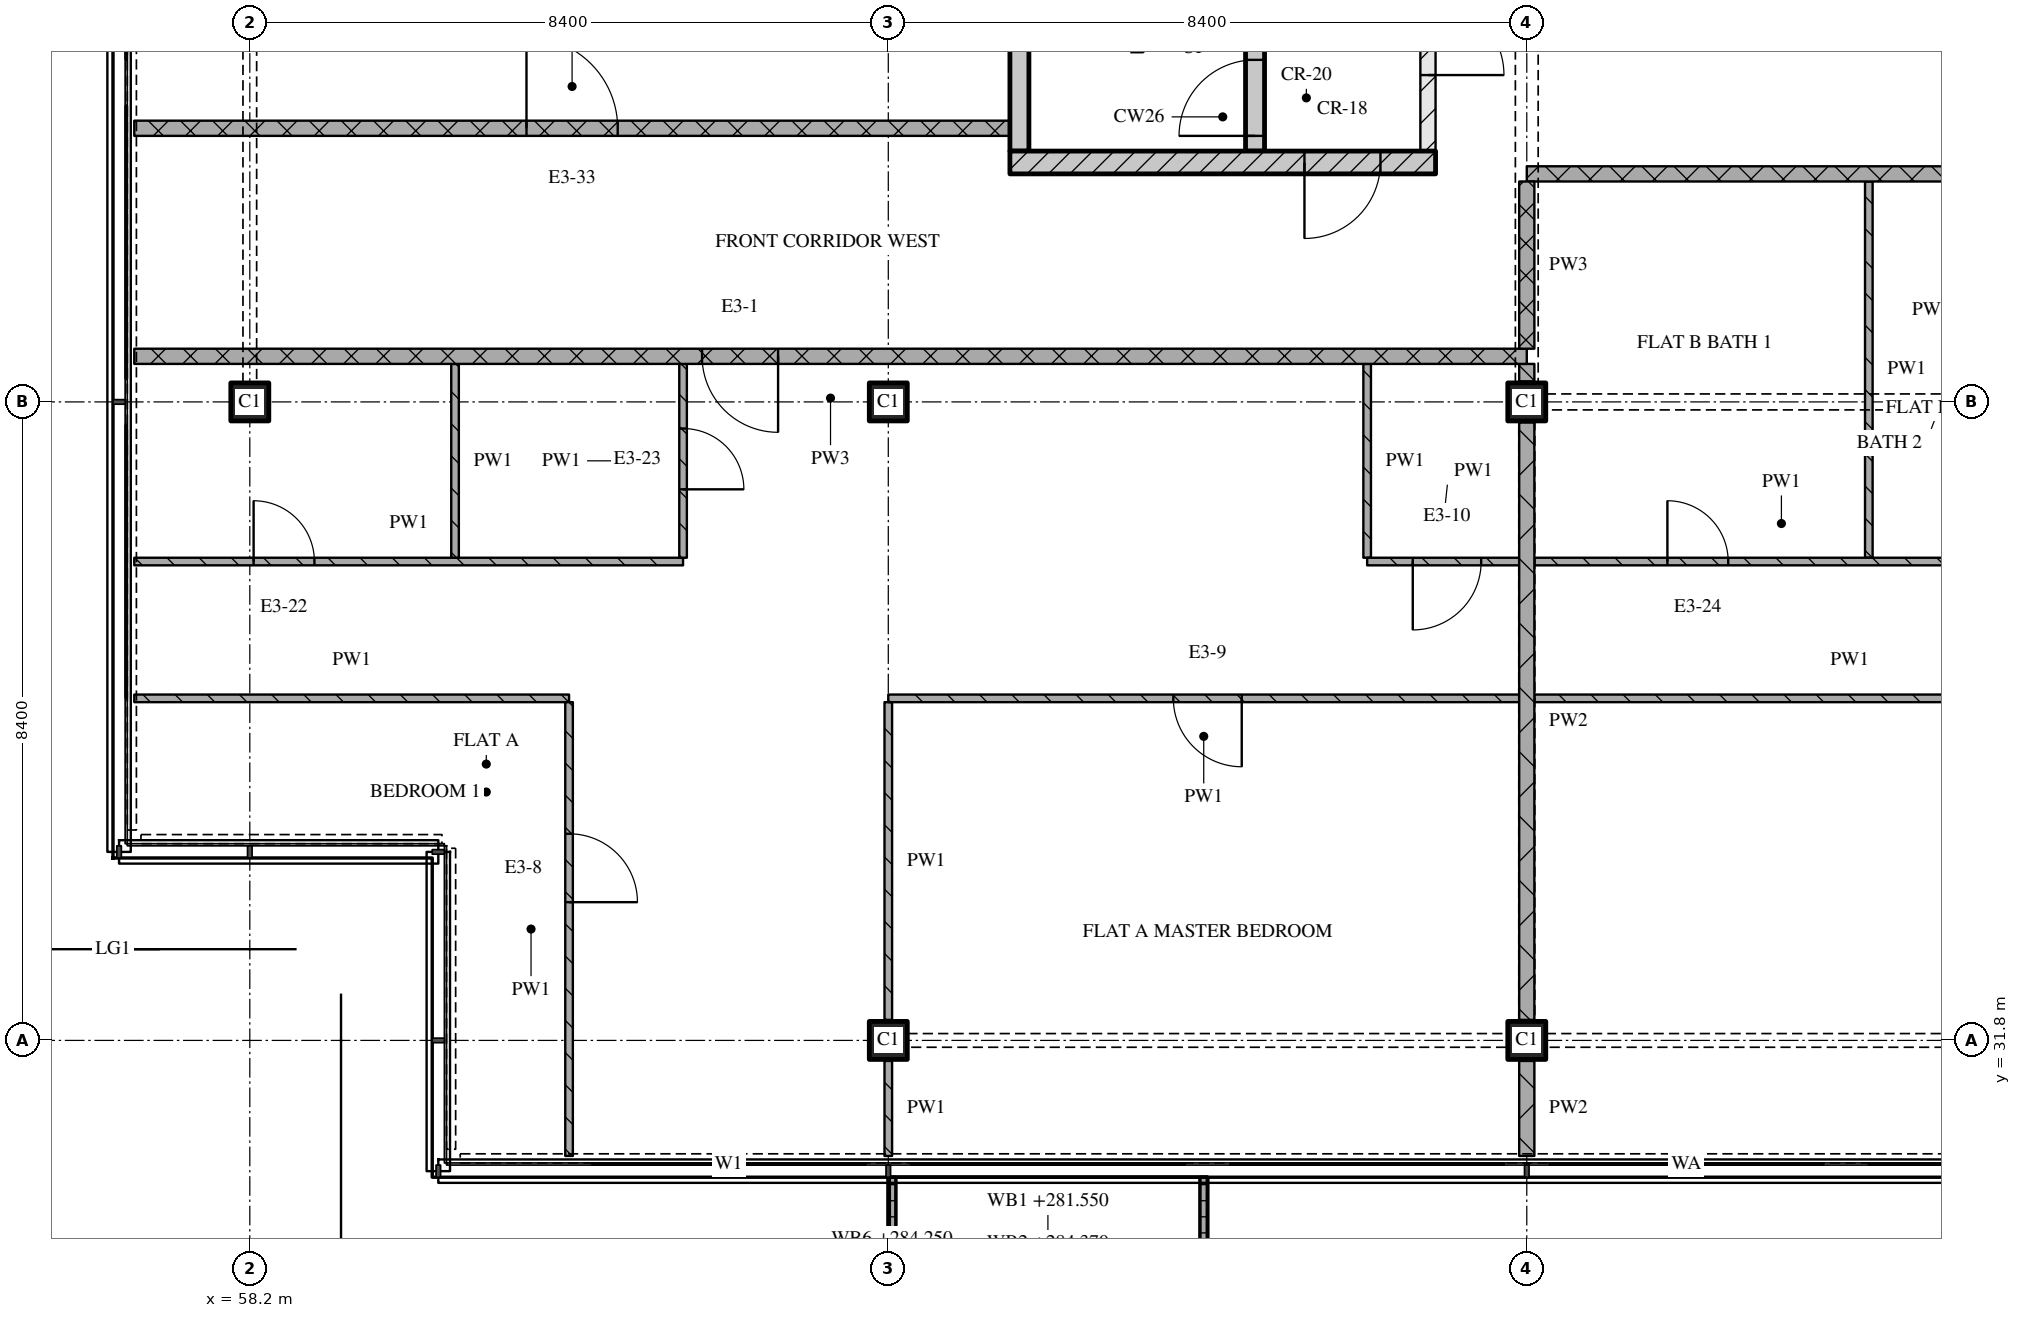
"""IFC4 building model, lengths in metres.
Left out: names, types, materials, properties, quantities, classifications, styles, units other than length and angle.
Written with IfcOpenShell. Run it as: python <this file> out.ifc"""

import sys

from ifc_helpers import new_model, si_unit, direction, frame, frame_2d, origin, origin_2d, place, context, subcontext, project, spatial, polyline, rectangle, outline, extrude, element, fill, save


model = new_model("IFC4")
c1 = context("Model", 3, precision=1e-05, world=origin(), true_north=direction((0.0, 1.0)))
c2 = subcontext(c1, "Body", "Model", "MODEL_VIEW")
j1 = project(units=[si_unit("LENGTHUNIT", "METRE"), si_unit("PLANEANGLEUNIT", "RADIAN")], contexts=[c1])
p1 = place(None, origin())
s1 = spatial("IfcSite", under=j1, at=p1, CompositionType="ELEMENT")
p2 = place(p1, origin())
s2 = spatial("IfcBuilding", under=s1, at=p2, CompositionType="ELEMENT")
p3 = place(p2, frame((0.0, 0.0, 281.55)))
s3 = spatial("IfcBuildingStorey", under=s2, at=p3, CompositionType="ELEMENT", Elevation=281.55)
for number, where, z_axis, x_axis in (
    (1, (58.2, 40.2, 0.0), (0.0, 0.0, 1.0), (1.0, 0.0, 0.0)),
    (2, (66.6, 31.8, 0.0), (0.0, 0.0, 1.0), (1.0, 0.0, 0.0)),
    (3, (66.6, 40.2, 0.0), (0.0, 0.0, 1.0), (1.0, 0.0, 0.0)),
    (4, (75.0, 31.8, 0.0), (0.0, 0.0, 1.0), (1.0, 0.0, 0.0)),
    (5, (75.0, 40.2, 0.0), (0.0, 0.0, 1.0), (1.0, 0.0, 0.0)),
):
    element("IfcColumn", number, at=place(p3, frame(where, z_axis=z_axis, x_axis=x_axis)), inside=s3, PredefinedType="COLUMN", context=c2, shape_type="SweptSolid", body=[
        extrude(rectangle(XDim=0.5, YDim=0.5, at=origin_2d()), origin(), (0.0, 0.0, 1.0), 3.6),
    ])
p4 = place(p3, origin())
e6 = element("IfcWall", 6, at=p4, inside=s3, PredefinedType="SOLIDWALL", context=c2, shape_type="SweptSolid", body=[
    extrude(outline(polyline([(66.6, 30.0), (66.7, 30.0), (66.7, 28.367), (70.7, 28.367), (70.7, 30.0), (70.8, 30.0), (70.8, 28.267), (66.6, 28.267), (66.6, 30.0)])), origin(), (0.0, 0.0, 1.0), 1.0),
])
p5 = place(p3, frame((68.2, 43.35, 0.0), z_axis=(0.0, 0.0, 1.0), x_axis=(1.0, 0.0, 0.0)))
e7 = element("IfcWall", 7, at=p5, inside=s3, PredefinedType="SOLIDWALL", context=c2, shape_type="SweptSolid", body=[
    extrude(rectangle(XDim=5.6, YDim=0.3, at=frame_2d((2.8, 0.0))), origin(), (0.0, 0.0, 1.0), 3.32),
])
p6 = place(p5, frame((3.875, 0.0, 0.0)))
e8 = element("IfcOpeningElement", 8, at=p6, cuts=e7, PredefinedType="OPENING", context=c2, shape_type="SweptSolid", body=[
    extrude(rectangle(XDim=1.0, YDim=2.1, at=frame_2d((0.5, 1.05))), frame((0.0, 0.16, 0.0), z_axis=(0.0, -1.0, 0.0), x_axis=(1.0, 0.0, 0.0)), (0.0, 0.0, 1.0), 0.32),
])
p7 = place(p3, frame((68.325, 43.5, 0.0), z_axis=(0.0, 0.0, 1.0), x_axis=(0.0, 1.0, 0.0)))
e9 = element("IfcWall", 9, at=p7, inside=s3, PredefinedType="SOLIDWALL", context=c2, shape_type="SweptSolid", body=[
    extrude(rectangle(XDim=6.9, YDim=0.25, at=frame_2d((3.45, 0.0))), origin(), (0.0, 0.0, 1.0), 3.32),
])
p8 = place(p3, frame((71.425, 43.5, 0.0), z_axis=(0.0, 0.0, 1.0), x_axis=(0.0, 1.0, 0.0)))
e10 = element("IfcWall", 10, at=p8, inside=s3, PredefinedType="SOLIDWALL", context=c2, shape_type="SweptSolid", body=[
    extrude(rectangle(XDim=6.9, YDim=0.25, at=frame_2d((3.45, 0.0))), origin(), (0.0, 0.0, 1.0), 3.32),
])
p9 = place(p8, frame((0.2, 0.0, 0.0)))
e11 = element("IfcOpeningElement", 11, at=p9, cuts=e10, PredefinedType="OPENING", context=c2, shape_type="SweptSolid", body=[
    extrude(rectangle(XDim=1.0, YDim=2.1, at=frame_2d((0.5, 1.05))), frame((0.0, 0.135, 0.0), z_axis=(0.0, -1.0, 0.0), x_axis=(1.0, 0.0, 0.0)), (0.0, 0.0, 1.0), 0.27),
])
p10 = place(p3, frame((73.7, 43.5, 0.0), z_axis=(0.0, 0.0, 1.0), x_axis=(0.0, 1.0, 0.0)))
e12 = element("IfcWall", 12, at=p10, inside=s3, PredefinedType="PARTITIONING", context=c2, shape_type="SweptSolid", body=[
    extrude(rectangle(XDim=6.9, YDim=0.2, at=frame_2d((3.45, 0.0))), origin(), (0.0, 0.0, 1.0), 3.32),
])
p11 = place(p10, frame((1.0, 0.0, 0.0)))
e13 = element("IfcOpeningElement", 13, at=p11, cuts=e12, PredefinedType="OPENING", context=c2, shape_type="SweptSolid", body=[
    extrude(rectangle(XDim=1.0, YDim=2.1, at=frame_2d((0.5, 1.05))), frame((0.0, 0.11, 0.0), z_axis=(0.0, -1.0, 0.0), x_axis=(1.0, 0.0, 0.0)), (0.0, 0.0, 1.0), 0.22),
])
p12 = place(p3, frame((56.68, 36.3, 0.0), z_axis=(0.0, 0.0, 1.0), x_axis=(1.0, 0.0, 0.0)))
e14 = element("IfcWall", 14, at=p12, inside=s3, PredefinedType="PARTITIONING", context=c2, shape_type="SweptSolid", body=[
    extrude(rectangle(XDim=5.72, YDim=0.1, at=frame_2d((2.86, 0.0))), origin(), (0.0, 0.0, 1.0), 3.32),
])
p13 = place(p3, frame((56.68, 38.1, 0.0), z_axis=(0.0, 0.0, 1.0), x_axis=(1.0, 0.0, 0.0)))
e15 = element("IfcWall", 15, at=p13, inside=s3, PredefinedType="PARTITIONING", context=c2, shape_type="SweptSolid", body=[
    extrude(rectangle(XDim=7.22, YDim=0.1, at=frame_2d((3.61, 0.0))), origin(), (0.0, 0.0, 1.0), 3.32),
])
p14 = place(p13, frame((1.57, 0.0, 0.0)))
e16 = element("IfcOpeningElement", 16, at=p14, cuts=e15, PredefinedType="OPENING", context=c2, shape_type="SweptSolid", body=[
    extrude(rectangle(XDim=0.8, YDim=2.1, at=frame_2d((0.4, 1.05))), frame((0.0, 0.06, 0.0), z_axis=(0.0, -1.0, 0.0), x_axis=(1.0, 0.0, 0.0)), (0.0, 0.0, 1.0), 0.12),
])
p15 = place(p3, frame((75.0, 40.8, 0.0), z_axis=(0.0, 0.0, 1.0), x_axis=(-1.0, 0.0, 0.0)))
e17 = element("IfcWall", 17, at=p15, inside=s3, PredefinedType="PARTITIONING", context=c2, shape_type="SweptSolid", body=[
    extrude(rectangle(XDim=18.32, YDim=0.2, at=frame_2d((9.16, 0.0))), origin(), (0.0, 0.0, 1.0), 3.32),
])
p16 = place(p15, frame((9.85, 0.0, 0.0)))
e18 = element("IfcOpeningElement", 18, at=p16, cuts=e17, PredefinedType="OPENING", context=c2, shape_type="SweptSolid", body=[
    extrude(rectangle(XDim=1.0, YDim=2.1, at=frame_2d((0.5, 1.05))), frame((0.0, 0.11, 0.0), z_axis=(0.0, -1.0, 0.0), x_axis=(1.0, 0.0, 0.0)), (0.0, 0.0, 1.0), 0.22),
])
p17 = place(p3, frame((100.2, 43.2, 0.0), z_axis=(0.0, 0.0, 1.0), x_axis=(-1.0, 0.0, 0.0)))
e19 = element("IfcWall", 19, at=p17, inside=s3, PredefinedType="PARTITIONING", context=c2, shape_type="SweptSolid", body=[
    extrude(rectangle(XDim=25.2, YDim=0.2, at=frame_2d((12.6, 0.0))), origin(), (0.0, 0.0, 1.0), 3.32),
])
p18 = place(p17, frame((17.35, 0.0, 0.0)))
e20 = element("IfcOpeningElement", 20, at=p18, cuts=e19, PredefinedType="OPENING", context=c2, shape_type="SweptSolid", body=[
    extrude(rectangle(XDim=1.0, YDim=2.1, at=frame_2d((0.5, 1.05))), frame((0.0, 0.11, 0.0), z_axis=(0.0, -1.0, 0.0), x_axis=(1.0, 0.0, 0.0)), (0.0, 0.0, 1.0), 0.22),
])
p19 = place(p3, frame((56.68, 43.8, 0.0), z_axis=(0.0, 0.0, 1.0), x_axis=(1.0, 0.0, 0.0)))
e21 = element("IfcWall", 21, at=p19, inside=s3, PredefinedType="PARTITIONING", context=c2, shape_type="SweptSolid", body=[
    extrude(rectangle(XDim=11.52, YDim=0.2, at=frame_2d((5.76, 0.0))), origin(), (0.0, 0.0, 1.0), 3.32),
])
p20 = place(p19, frame((5.16, 0.0, 0.0)))
e22 = element("IfcOpeningElement", 22, at=p20, cuts=e21, PredefinedType="OPENING", context=c2, shape_type="SweptSolid", body=[
    extrude(rectangle(XDim=1.2, YDim=2.1, at=frame_2d((0.6, 1.05))), frame((0.0, 0.11, 0.0), z_axis=(0.0, -1.0, 0.0), x_axis=(1.0, 0.0, 0.0)), (0.0, 0.0, 1.0), 0.22),
])
p21 = place(p3, frame((60.9, 40.7, 0.0), z_axis=(0.0, 0.0, 1.0), x_axis=(0.0, -1.0, 0.0)))
e23 = element("IfcWall", 23, at=p21, inside=s3, PredefinedType="PARTITIONING", context=c2, shape_type="SweptSolid", body=[
    extrude(rectangle(XDim=2.55, YDim=0.1, at=frame_2d((1.275, 0.0))), origin(), (0.0, 0.0, 1.0), 3.32),
])
p22 = place(p3, frame((62.4, 30.28, 0.0), z_axis=(0.0, 0.0, 1.0), x_axis=(0.0, 1.0, 0.0)))
e24 = element("IfcWall", 24, at=p22, inside=s3, PredefinedType="PARTITIONING", context=c2, shape_type="SweptSolid", body=[
    extrude(rectangle(XDim=5.97, YDim=0.1, at=frame_2d((2.985, 0.0))), origin(), (0.0, 0.0, 1.0), 3.32),
])
p23 = place(p22, frame((3.339, 0.0, 0.0)))
e25 = element("IfcOpeningElement", 25, at=p23, cuts=e24, PredefinedType="OPENING", context=c2, shape_type="SweptSolid", body=[
    extrude(rectangle(XDim=0.9, YDim=2.1, at=frame_2d((0.45, 1.05))), frame((0.0, 0.06, 0.0), z_axis=(0.0, -1.0, 0.0), x_axis=(1.0, 0.0, 0.0)), (0.0, 0.0, 1.0), 0.12),
])
p24 = place(p3, frame((63.9, 38.15, 0.0), z_axis=(0.0, 0.0, 1.0), x_axis=(0.0, 1.0, 0.0)))
e26 = element("IfcWall", 26, at=p24, inside=s3, PredefinedType="PARTITIONING", context=c2, shape_type="SweptSolid", body=[
    extrude(rectangle(XDim=2.55, YDim=0.1, at=frame_2d((1.275, 0.0))), origin(), (0.0, 0.0, 1.0), 3.32),
])
p25 = place(p24, frame((0.9, 0.0, 0.0)))
e27 = element("IfcOpeningElement", 27, at=p25, cuts=e26, PredefinedType="OPENING", context=c2, shape_type="SweptSolid", body=[
    extrude(rectangle(XDim=0.8, YDim=2.1, at=frame_2d((0.4, 1.05))), frame((0.0, 0.06, 0.0), z_axis=(0.0, -1.0, 0.0), x_axis=(1.0, 0.0, 0.0)), (0.0, 0.0, 1.0), 0.12),
])
p26 = place(p3, frame((66.6, 31.53, 0.0), z_axis=(0.0, 0.0, 1.0), x_axis=(0.0, -1.0, 0.0)))
e28 = element("IfcWall", 28, at=p26, inside=s3, PredefinedType="PARTITIONING", context=c2, shape_type="SweptSolid", body=[
    extrude(rectangle(XDim=1.25, YDim=0.1, at=frame_2d((0.625, 0.0))), origin(), (0.0, 0.0, 1.0), 3.32),
])
p27 = place(p3, frame((66.6, 36.25, 0.0), z_axis=(0.0, 0.0, 1.0), x_axis=(0.0, -1.0, 0.0)))
e29 = element("IfcWall", 29, at=p27, inside=s3, PredefinedType="PARTITIONING", context=c2, shape_type="SweptSolid", body=[
    extrude(rectangle(XDim=4.18, YDim=0.1, at=frame_2d((2.09, 0.0))), origin(), (0.0, 0.0, 1.0), 2.83),
])
p28 = place(p3, frame((72.9, 40.7, 0.0), z_axis=(0.0, 0.0, 1.0), x_axis=(0.0, -1.0, 0.0)))
e30 = element("IfcWall", 30, at=p28, inside=s3, PredefinedType="PARTITIONING", context=c2, shape_type="SweptSolid", body=[
    extrude(rectangle(XDim=2.55, YDim=0.1, at=frame_2d((1.275, 0.0))), origin(), (0.0, 0.0, 1.0), 3.32),
])
p29 = place(p3, frame((75.0, 43.1, 0.0), z_axis=(0.0, 0.0, 1.0), x_axis=(0.0, -1.0, 0.0)))
e31 = element("IfcWall", 31, at=p29, inside=s3, PredefinedType="PARTITIONING", context=c2, shape_type="SweptSolid", body=[
    extrude(rectangle(XDim=2.2, YDim=0.2, at=frame_2d((1.1, 0.0))), origin(), (0.0, 0.0, 1.0), 2.53),
])
p30 = place(p3, frame((75.0, 31.53, 0.0), z_axis=(0.0, 0.0, 1.0), x_axis=(0.0, -1.0, 0.0)))
e32 = element("IfcWall", 32, at=p30, inside=s3, PredefinedType="PARTITIONING", context=c2, shape_type="SweptSolid", body=[
    extrude(rectangle(XDim=1.25, YDim=0.2, at=frame_2d((0.625, 0.0))), origin(), (0.0, 0.0, 1.0), 3.32),
])
p31 = place(p3, frame((75.0, 39.93, 0.0), z_axis=(0.0, 0.0, 1.0), x_axis=(0.0, -1.0, 0.0)))
e33 = element("IfcWall", 33, at=p31, inside=s3, PredefinedType="PARTITIONING", context=c2, shape_type="SweptSolid", body=[
    extrude(rectangle(XDim=7.86, YDim=0.2, at=frame_2d((3.93, 0.0))), origin(), (0.0, 0.0, 1.0), 2.83),
])
p32 = place(p3, frame((75.0, 40.7, 0.0), z_axis=(0.0, 0.0, 1.0), x_axis=(0.0, -1.0, 0.0)))
e34 = element("IfcWall", 34, at=p32, inside=s3, PredefinedType="PARTITIONING", context=c2, shape_type="SweptSolid", body=[
    extrude(rectangle(XDim=0.23, YDim=0.2, at=frame_2d((0.115, 0.0))), origin(), (0.0, 0.0, 1.0), 3.32),
])
p33 = place(p3, frame((79.5, 43.1, 0.0), z_axis=(0.0, 0.0, 1.0), x_axis=(0.0, -1.0, 0.0)))
e35 = element("IfcWall", 35, at=p33, inside=s3, PredefinedType="PARTITIONING", context=c2, shape_type="SweptSolid", body=[
    extrude(rectangle(XDim=4.95, YDim=0.1, at=frame_2d((2.475, 0.0))), origin(), (0.0, 0.0, 1.0), 3.32),
])
p34 = place(p3, frame((74.9, 36.3, 0.0), z_axis=(0.0, 0.0, 1.0), x_axis=(-1.0, 0.0, 0.0)))
e36 = element("IfcWall", 36, at=p34, inside=s3, PredefinedType="PARTITIONING", context=c2, shape_type="SweptSolid", body=[
    extrude(rectangle(XDim=8.3, YDim=0.1, at=frame_2d((4.15, 0.0))), origin(), (0.0, 0.0, 1.0), 3.32),
])
p35 = place(p34, frame((3.65, 0.0, 0.0)))
e37 = element("IfcOpeningElement", 37, at=p35, cuts=e36, PredefinedType="OPENING", context=c2, shape_type="SweptSolid", body=[
    extrude(rectangle(XDim=0.9, YDim=2.1, at=frame_2d((0.45, 1.05))), frame((0.0, 0.06, 0.0), z_axis=(0.0, -1.0, 0.0), x_axis=(1.0, 0.0, 0.0)), (0.0, 0.0, 1.0), 0.12),
])
p36 = place(p3, frame((75.1, 36.3, 0.0), z_axis=(0.0, 0.0, 1.0), x_axis=(1.0, 0.0, 0.0)))
e38 = element("IfcWall", 38, at=p36, inside=s3, PredefinedType="PARTITIONING", context=c2, shape_type="SweptSolid", body=[
    extrude(rectangle(XDim=8.3, YDim=0.1, at=frame_2d((4.15, 0.0))), origin(), (0.0, 0.0, 1.0), 3.32),
])
p37 = place(p3, frame((72.9, 38.1, 0.0), z_axis=(0.0, 0.0, 1.0), x_axis=(1.0, 0.0, 0.0)))
e39 = element("IfcWall", 39, at=p37, inside=s3, PredefinedType="PARTITIONING", context=c2, shape_type="SweptSolid", body=[
    extrude(rectangle(XDim=2.0, YDim=0.1, at=frame_2d((1.0, 0.0))), origin(), (0.0, 0.0, 1.0), 3.32),
])
p38 = place(p37, frame((0.6, 0.0, 0.0)))
e40 = element("IfcOpeningElement", 40, at=p38, cuts=e39, PredefinedType="OPENING", context=c2, shape_type="SweptSolid", body=[
    extrude(rectangle(XDim=0.9, YDim=2.1, at=frame_2d((0.45, 1.05))), frame((0.0, 0.06, 0.0), z_axis=(0.0, -1.0, 0.0), x_axis=(1.0, 0.0, 0.0)), (0.0, 0.0, 1.0), 0.12),
])
p39 = place(p3, frame((75.1, 38.1, 0.0), z_axis=(0.0, 0.0, 1.0), x_axis=(1.0, 0.0, 0.0)))
e41 = element("IfcWall", 41, at=p39, inside=s3, PredefinedType="PARTITIONING", context=c2, shape_type="SweptSolid", body=[
    extrude(rectangle(XDim=6.5, YDim=0.1, at=frame_2d((3.25, 0.0))), origin(), (0.0, 0.0, 1.0), 3.32),
])
p40 = place(p39, frame((1.75, 0.0, 0.0)))
e42 = element("IfcOpeningElement", 42, at=p40, cuts=e41, PredefinedType="OPENING", context=c2, shape_type="SweptSolid", body=[
    extrude(rectangle(XDim=0.8, YDim=2.1, at=frame_2d((0.4, 1.05))), frame((0.0, 0.06, 0.0), z_axis=(0.0, -1.0, 0.0), x_axis=(1.0, 0.0, 0.0)), (0.0, 0.0, 1.0), 0.12),
])
p41 = place(p6, origin())
e43 = element("IfcDoor", 43, at=p41, inside=s3, OperationType="SINGLE_SWING_RIGHT", PredefinedType="DOOR", context=c2, shape_type="SweptSolid", body=[
    extrude(rectangle(XDim=1.0, YDim=2.1, at=frame_2d((0.5, 1.05))), frame((0.0, 0.025, 0.0), z_axis=(0.0, -1.0, 0.0), x_axis=(1.0, 0.0, 0.0)), (0.0, 0.0, 1.0), 0.05),
])
fill(e8, e43)
p42 = place(p9, origin())
e44 = element("IfcDoor", 44, at=p42, inside=s3, OperationType="SINGLE_SWING_LEFT", PredefinedType="DOOR", context=c2, shape_type="SweptSolid", body=[
    extrude(rectangle(XDim=1.0, YDim=2.1, at=frame_2d((0.5, 1.05))), frame((0.0, 0.025, 0.0), z_axis=(0.0, -1.0, 0.0), x_axis=(1.0, 0.0, 0.0)), (0.0, 0.0, 1.0), 0.05),
])
fill(e11, e44)
p43 = place(p11, origin())
e45 = element("IfcDoor", 45, at=p43, inside=s3, OperationType="SINGLE_SWING_RIGHT", PredefinedType="DOOR", context=c2, shape_type="SweptSolid", body=[
    extrude(rectangle(XDim=1.0, YDim=2.1, at=frame_2d((0.5, 1.05))), frame((0.0, 0.025, 0.0), z_axis=(0.0, -1.0, 0.0), x_axis=(1.0, 0.0, 0.0)), (0.0, 0.0, 1.0), 0.05),
])
fill(e13, e45)
p44 = place(p14, origin())
e46 = element("IfcDoor", 46, at=p44, inside=s3, OperationType="SINGLE_SWING_LEFT", PredefinedType="DOOR", context=c2, shape_type="SweptSolid", body=[
    extrude(rectangle(XDim=0.8, YDim=2.1, at=frame_2d((0.4, 1.05))), frame((0.0, 0.025, 0.0), z_axis=(0.0, -1.0, 0.0), x_axis=(1.0, 0.0, 0.0)), (0.0, 0.0, 1.0), 0.05),
])
fill(e16, e46)
p45 = place(p16, origin())
e47 = element("IfcDoor", 47, at=p45, inside=s3, OperationType="SINGLE_SWING_LEFT", PredefinedType="DOOR", context=c2, shape_type="SweptSolid", body=[
    extrude(rectangle(XDim=1.0, YDim=2.1, at=frame_2d((0.5, 1.05))), frame((0.0, 0.025, 0.0), z_axis=(0.0, -1.0, 0.0), x_axis=(1.0, 0.0, 0.0)), (0.0, 0.0, 1.0), 0.05),
])
fill(e18, e47)
p46 = place(p20, origin())
e48 = element("IfcDoor", 48, at=p46, inside=s3, OperationType="SINGLE_SWING_LEFT", PredefinedType="DOOR", context=c2, shape_type="SweptSolid", body=[
    extrude(rectangle(XDim=1.2, YDim=2.1, at=frame_2d((0.6, 1.05))), frame((0.0, 0.025, 0.0), z_axis=(0.0, -1.0, 0.0), x_axis=(1.0, 0.0, 0.0)), (0.0, 0.0, 1.0), 0.05),
])
fill(e22, e48)
p47 = place(p23, origin())
e49 = element("IfcDoor", 49, at=p47, inside=s3, OperationType="SINGLE_SWING_RIGHT", PredefinedType="DOOR", context=c2, shape_type="SweptSolid", body=[
    extrude(rectangle(XDim=0.9, YDim=2.1, at=frame_2d((0.45, 1.05))), frame((0.0, 0.025, 0.0), z_axis=(0.0, -1.0, 0.0), x_axis=(1.0, 0.0, 0.0)), (0.0, 0.0, 1.0), 0.05),
])
fill(e25, e49)
p48 = place(p25, origin())
e50 = element("IfcDoor", 50, at=p48, inside=s3, OperationType="SINGLE_SWING_RIGHT", PredefinedType="DOOR", context=c2, shape_type="SweptSolid", body=[
    extrude(rectangle(XDim=0.8, YDim=2.1, at=frame_2d((0.4, 1.05))), frame((0.0, 0.025, 0.0), z_axis=(0.0, -1.0, 0.0), x_axis=(1.0, 0.0, 0.0)), (0.0, 0.0, 1.0), 0.05),
])
fill(e27, e50)
p49 = place(p35, origin())
e51 = element("IfcDoor", 51, at=p49, inside=s3, OperationType="SINGLE_SWING_LEFT", PredefinedType="DOOR", context=c2, shape_type="SweptSolid", body=[
    extrude(rectangle(XDim=0.9, YDim=2.1, at=frame_2d((0.45, 1.05))), frame((0.0, 0.025, 0.0), z_axis=(0.0, -1.0, 0.0), x_axis=(1.0, 0.0, 0.0)), (0.0, 0.0, 1.0), 0.05),
])
fill(e37, e51)
p50 = place(p38, origin())
e52 = element("IfcDoor", 52, at=p50, inside=s3, OperationType="SINGLE_SWING_RIGHT", PredefinedType="DOOR", context=c2, shape_type="SweptSolid", body=[
    extrude(rectangle(XDim=0.9, YDim=2.1, at=frame_2d((0.45, 1.05))), frame((0.0, 0.025, 0.0), z_axis=(0.0, -1.0, 0.0), x_axis=(1.0, 0.0, 0.0)), (0.0, 0.0, 1.0), 0.05),
])
fill(e40, e52)
p51 = place(p40, origin())
e53 = element("IfcDoor", 53, at=p51, inside=s3, OperationType="SINGLE_SWING_LEFT", PredefinedType="DOOR", context=c2, shape_type="SweptSolid", body=[
    extrude(rectangle(XDim=0.8, YDim=2.1, at=frame_2d((0.4, 1.05))), frame((0.0, 0.025, 0.0), z_axis=(0.0, -1.0, 0.0), x_axis=(1.0, 0.0, 0.0)), (0.0, 0.0, 1.0), 0.05),
])
fill(e42, e53)
save(model, sys.argv[1])
